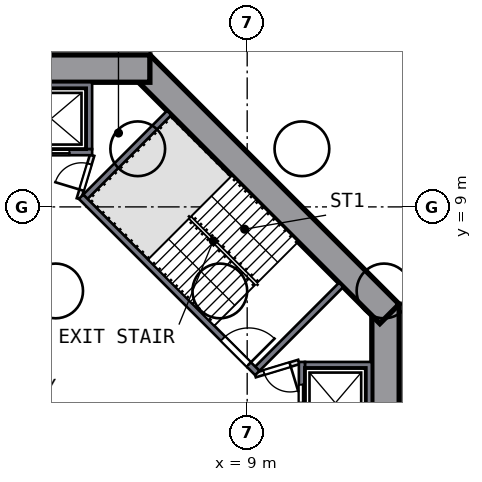
"""IFC4 building model, lengths in metres.
Left out: names, types, materials, properties, quantities, classifications, styles, units other than length and angle.
Written with IfcOpenShell. Run it as: python <this file> out.ifc"""

import sys

from ifc_helpers import new_model, si_unit, direction, frame, frame_2d, origin, place, context, subcontext, project, spatial, polyline, rectangle, outline, extrude, element, fill, save


model = new_model("IFC4")
c1 = context("Model", 3, precision=1e-05, world=origin(), true_north=direction((0.0, 1.0)))
c2 = subcontext(c1, "Body", "Model", "MODEL_VIEW")
j1 = project(units=[si_unit("LENGTHUNIT", "METRE"), si_unit("PLANEANGLEUNIT", "RADIAN")], contexts=[c1])
p1 = place(None, origin())
s1 = spatial("IfcSite", under=j1, at=p1, CompositionType="ELEMENT")
p2 = place(p1, origin())
s2 = spatial("IfcBuilding", under=s1, at=p2, CompositionType="ELEMENT")
p3 = place(p2, frame((0.0, 0.0, -11.7)))
s3 = spatial("IfcBuildingStorey", under=s2, at=p3, CompositionType="ELEMENT", Elevation=-11.7)
p4 = place(p3, frame((13.55, -5.799, 0.0), z_axis=(0.0, 0.0, 1.0), x_axis=(0.0, 1.0, 0.0)))
e1 = element("IfcWall", 1, at=p4, inside=s3, PredefinedType="SHEAR", context=c2, shape_type="SweptSolid", body=[
    extrude(rectangle(XDim=11.598, YDim=0.9, at=frame_2d((5.799, 0.0))), origin(), (0.0, 0.0, 1.0), 3.9),
])
p5 = place(p4, frame((4.899, 0.0, 0.0)))
e2 = element("IfcOpeningElement", 2, at=p5, cuts=e1, PredefinedType="OPENING", context=c2, shape_type="SweptSolid", body=[
    extrude(rectangle(XDim=1.8, YDim=2.1, at=frame_2d((0.9, 1.05))), frame((0.0, 0.46, 0.0), z_axis=(0.0, -1.0, 0.0), x_axis=(1.0, 0.0, 0.0)), (0.0, 0.0, 1.0), 0.92),
])
p6 = place(p3, frame((13.682, 5.481, 0.0), z_axis=(0.0, 0.0, 1.0), x_axis=(-0.707106781, 0.707106781, 0.0)))
e3 = element("IfcWall", 3, at=p6, inside=s3, PredefinedType="SHEAR", context=c2, shape_type="SweptSolid", body=[
    extrude(rectangle(XDim=11.598, YDim=0.9, at=frame_2d((5.799, 0.0))), origin(), (0.0, 0.0, 1.0), 3.9),
])
p7 = place(p3, frame((5.799, 13.55, 0.0), z_axis=(0.0, 0.0, 1.0), x_axis=(-1.0, 0.0, 0.0)))
e4 = element("IfcWall", 4, at=p7, inside=s3, PredefinedType="SHEAR", context=c2, shape_type="SweptSolid", body=[
    extrude(rectangle(XDim=11.598, YDim=0.9, at=frame_2d((5.799, 0.0))), origin(), (0.0, 0.0, 1.0), 3.9),
])
p8 = place(p7, frame((4.899, 0.0, 0.0)))
e5 = element("IfcOpeningElement", 5, at=p8, cuts=e4, PredefinedType="OPENING", context=c2, shape_type="SweptSolid", body=[
    extrude(rectangle(XDim=1.8, YDim=2.1, at=frame_2d((0.9, 1.05))), frame((0.0, 0.46, 0.0), z_axis=(0.0, -1.0, 0.0), x_axis=(1.0, 0.0, 0.0)), (0.0, 0.0, 1.0), 0.92),
])
p9 = place(p3, origin())
e6 = element("IfcWall", 6, at=p9, inside=s3, PredefinedType="SOLIDWALL", context=c2, shape_type="SweptSolid", body=[
    extrude(outline(polyline([(13.1, 3.9), (13.1, 1.2), (10.9, 1.2), (10.9, 1.4), (12.9, 1.4), (12.9, 3.7), (10.9, 3.7), (10.9, 3.9), (13.1, 3.9)])), origin(), (0.0, 0.0, 1.0), 3.45),
])
p10 = place(p3, frame((10.8, 1.2, 0.0), z_axis=(0.0, 0.0, 1.0), x_axis=(0.0, 1.0, 0.0)))
e7 = element("IfcWall", 7, at=p10, inside=s3, PredefinedType="SOLIDWALL", context=c2, shape_type="SweptSolid", body=[
    extrude(rectangle(XDim=2.7, YDim=0.2, at=frame_2d((1.35, 0.0))), origin(), (0.0, 0.0, 1.0), 3.45),
])
p11 = place(p10, frame((0.75, 0.0, 0.0)))
e8 = element("IfcOpeningElement", 8, at=p11, cuts=e7, PredefinedType="OPENING", context=c2, shape_type="SweptSolid", body=[
    extrude(rectangle(XDim=1.2, YDim=2.1, at=frame_2d((0.6, 1.05))), frame((0.0, 0.11, 0.0), z_axis=(0.0, -1.0, 0.0), x_axis=(1.0, 0.0, 0.0)), (0.0, 0.0, 1.0), 0.22),
])
p12 = place(p3, origin())
e9 = element("IfcWall", 9, at=p12, inside=s3, PredefinedType="SOLIDWALL", context=c2, shape_type="SweptSolid", body=[
    extrude(outline(polyline([(3.9, 13.1), (3.9, 10.9), (3.7, 10.9), (3.7, 12.9), (1.4, 12.9), (1.4, 10.9), (1.2, 10.9), (1.2, 13.1), (3.9, 13.1)])), origin(), (0.0, 0.0, 1.0), 3.45),
])
p13 = place(p3, frame((1.2, 10.8, 0.0), z_axis=(0.0, 0.0, 1.0), x_axis=(1.0, 0.0, 0.0)))
e10 = element("IfcWall", 10, at=p13, inside=s3, PredefinedType="SOLIDWALL", context=c2, shape_type="SweptSolid", body=[
    extrude(rectangle(XDim=2.7, YDim=0.2, at=frame_2d((1.35, 0.0))), origin(), (0.0, 0.0, 1.0), 3.45),
])
p14 = place(p13, frame((0.75, 0.0, 0.0)))
e11 = element("IfcOpeningElement", 11, at=p14, cuts=e10, PredefinedType="OPENING", context=c2, shape_type="SweptSolid", body=[
    extrude(rectangle(XDim=1.2, YDim=2.1, at=frame_2d((0.6, 1.05))), frame((0.0, 0.11, 0.0), z_axis=(0.0, -1.0, 0.0), x_axis=(1.0, 0.0, 0.0)), (0.0, 0.0, 1.0), 0.22),
])
p15 = place(p3, frame((3.535, 9.334, 0.0), z_axis=(0.0, 0.0, 1.0), x_axis=(0.707106781, -0.707106781, 0.0)))
e12 = element("IfcWall", 12, at=p15, inside=s3, PredefinedType="SOLIDWALL", context=c2, shape_type="SweptSolid", body=[
    extrude(rectangle(XDim=8.2, YDim=0.2, at=frame_2d((4.1, 0.0))), origin(), (0.0, 0.0, 1.0), 3.45),
])
p16 = place(p15, frame((6.6, 0.0, 0.0)))
e13 = element("IfcOpeningElement", 13, at=p16, cuts=e12, PredefinedType="OPENING", context=c2, shape_type="SweptSolid", body=[
    extrude(rectangle(XDim=1.2, YDim=2.1, at=frame_2d((0.6, 1.05))), frame((0.0, 0.11, 0.0), z_axis=(0.0, -1.0, 0.0), x_axis=(1.0, 0.0, 0.0)), (0.0, 0.0, 1.0), 0.22),
])
for number, where, z_axis, x_axis in (
    (14, (9.334, 3.677, 0.0), (0.0, 0.0, 1.0), (0.707, 0.707, 0.0)),
    (15, (3.677, 9.334, 0.0), (0.0, 0.0, 1.0), (0.707, 0.707, 0.0)),
):
    element("IfcWall", number, at=place(p3, frame(where, z_axis=z_axis, x_axis=x_axis)), inside=s3, PredefinedType="SOLIDWALL", context=c2, shape_type="SweptSolid", body=[
        extrude(rectangle(XDim=3.9, YDim=0.2, at=frame_2d((1.95, 0.0))), origin(), (0.0, 0.0, 1.0), 3.45),
    ])
p17 = place(p3, frame((10.7, 3.9, 0.0), z_axis=(0.0, 0.0, 1.0), x_axis=(-0.957084567, -0.289808785, 0.0)))
e16 = element("IfcWall", 16, at=p17, inside=s3, PredefinedType="PARTITIONING", context=c2, shape_type="SweptSolid", body=[
    extrude(rectangle(XDim=1.501, YDim=0.15, at=frame_2d((0.75, 0.0))), origin(), (0.0, 0.0, 1.0), 3.45),
])
p18 = place(p17, frame((0.301, 0.0, 0.0)))
e17 = element("IfcOpeningElement", 17, at=p18, cuts=e16, PredefinedType="OPENING", context=c2, shape_type="SweptSolid", body=[
    extrude(rectangle(XDim=0.9, YDim=2.1, at=frame_2d((0.45, 1.05))), frame((0.0, 0.085, 0.0), z_axis=(0.0, -1.0, 0.0), x_axis=(1.0, 0.0, 0.0)), (0.0, 0.0, 1.0), 0.17),
])
p19 = place(p3, frame((3.465, 9.263, 0.0), z_axis=(0.0, 0.0, 1.0), x_axis=(0.289808785, 0.957084567, 0.0)))
e18 = element("IfcWall", 18, at=p19, inside=s3, PredefinedType="PARTITIONING", context=c2, shape_type="SweptSolid", body=[
    extrude(rectangle(XDim=1.501, YDim=0.15, at=frame_2d((0.75, 0.0))), origin(), (0.0, 0.0, 1.0), 3.45),
])
p20 = place(p19, frame((0.301, 0.0, 0.0)))
e19 = element("IfcOpeningElement", 19, at=p20, cuts=e18, PredefinedType="OPENING", context=c2, shape_type="SweptSolid", body=[
    extrude(rectangle(XDim=0.9, YDim=2.1, at=frame_2d((0.45, 1.05))), frame((0.0, 0.085, 0.0), z_axis=(0.0, -1.0, 0.0), x_axis=(1.0, 0.0, 0.0)), (0.0, 0.0, 1.0), 0.17),
])
p21 = place(p11, origin())
e20 = element("IfcDoor", 20, at=p21, inside=s3, OperationType="DOUBLE_DOOR_SLIDING", PredefinedType="DOOR", context=c2, shape_type="SweptSolid", body=[
    extrude(rectangle(XDim=1.2, YDim=2.1, at=frame_2d((0.6, 1.05))), frame((0.0, 0.025, 0.0), z_axis=(0.0, -1.0, 0.0), x_axis=(1.0, 0.0, 0.0)), (0.0, 0.0, 1.0), 0.05),
])
fill(e8, e20)
p22 = place(p14, origin())
e21 = element("IfcDoor", 21, at=p22, inside=s3, OperationType="DOUBLE_DOOR_SLIDING", PredefinedType="DOOR", context=c2, shape_type="SweptSolid", body=[
    extrude(rectangle(XDim=1.2, YDim=2.1, at=frame_2d((0.6, 1.05))), frame((0.0, 0.025, 0.0), z_axis=(0.0, -1.0, 0.0), x_axis=(1.0, 0.0, 0.0)), (0.0, 0.0, 1.0), 0.05),
])
fill(e11, e21)
p23 = place(p16, origin())
e22 = element("IfcDoor", 22, at=p23, inside=s3, OperationType="SINGLE_SWING_RIGHT", PredefinedType="DOOR", context=c2, shape_type="SweptSolid", body=[
    extrude(rectangle(XDim=1.2, YDim=2.1, at=frame_2d((0.6, 1.05))), frame((0.0, 0.025, 0.0), z_axis=(0.0, -1.0, 0.0), x_axis=(1.0, 0.0, 0.0)), (0.0, 0.0, 1.0), 0.05),
])
fill(e13, e22)
p24 = place(p18, origin())
e23 = element("IfcDoor", 23, at=p24, inside=s3, OperationType="SINGLE_SWING_LEFT", PredefinedType="DOOR", context=c2, shape_type="SweptSolid", body=[
    extrude(rectangle(XDim=0.9, YDim=2.1, at=frame_2d((0.45, 1.05))), frame((0.0, 0.025, 0.0), z_axis=(0.0, -1.0, 0.0), x_axis=(1.0, 0.0, 0.0)), (0.0, 0.0, 1.0), 0.05),
])
fill(e17, e23)
p25 = place(p20, origin())
e24 = element("IfcDoor", 24, at=p25, inside=s3, OperationType="SINGLE_SWING_LEFT", PredefinedType="DOOR", context=c2, shape_type="SweptSolid", body=[
    extrude(rectangle(XDim=0.9, YDim=2.1, at=frame_2d((0.45, 1.05))), frame((0.0, 0.025, 0.0), z_axis=(0.0, -1.0, 0.0), x_axis=(1.0, 0.0, 0.0)), (0.0, 0.0, 1.0), 0.05),
])
fill(e19, e24)
save(model, sys.argv[1])
